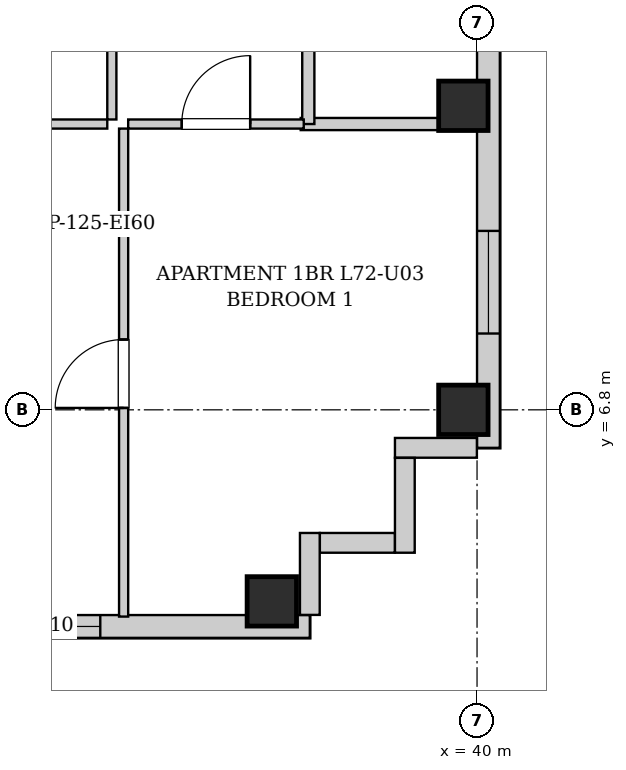
"""IFC4 building model, lengths in metres.
Left out: names, types, materials, properties, quantities, classifications, styles, units other than length and angle.
Written with IfcOpenShell. Run it as: python <this file> out.ifc"""

import sys

from ifc_helpers import new_model, si_unit, direction, frame, frame_2d, origin, origin_2d, place, context, subcontext, project, spatial, rectangle, extrude, element, fill, save


model = new_model("IFC4")
c1 = context("Model", 3, precision=1e-05, world=origin(), true_north=direction((0.0, 1.0)))
c2 = subcontext(c1, "Body", "Model", "MODEL_VIEW")
j1 = project(units=[si_unit("LENGTHUNIT", "METRE"), si_unit("PLANEANGLEUNIT", "RADIAN")], contexts=[c1])
p1 = place(None, origin())
s1 = spatial("IfcSite", under=j1, at=p1, CompositionType="ELEMENT")
p2 = place(p1, origin())
s2 = spatial("IfcBuilding", under=s1, at=p2, CompositionType="ELEMENT")
p3 = place(p2, frame((0.0, 0.0, 247.9)))
s3 = spatial("IfcBuildingStorey", under=s2, at=p3, CompositionType="ELEMENT", Elevation=247.9)
for number, where, z_axis, x_axis in (
    (1, (37.3, 4.28, 0.0), (0.0, 0.0, 1.0), (1.0, 0.0, 0.0)),
    (2, (39.82, 6.8, 0.0), (0.0, 0.0, 1.0), (1.0, 0.0, 0.0)),
    (3, (39.82, 10.8, 0.0), (0.0, 0.0, 1.0), (1.0, 0.0, 0.0)),
):
    element("IfcColumn", number, at=place(p3, frame(where, z_axis=z_axis, x_axis=x_axis)), inside=s3, PredefinedType="COLUMN", context=c2, shape_type="SweptSolid", body=[
        extrude(rectangle(XDim=0.65, YDim=0.65, at=origin_2d()), origin(), (0.0, 0.0, 1.0), 3.4),
    ])
p4 = place(p3, frame((40.15, 37.7, 0.0), z_axis=(0.0, 0.0, 1.0), x_axis=(0.0, -1.0, 0.0)))
e4 = element("IfcWall", 4, at=p4, inside=s3, PredefinedType="SOLIDWALL", context=c2, shape_type="SweptSolid", body=[
    extrude(rectangle(XDim=31.4, YDim=0.3, at=frame_2d((15.7, 0.0))), origin(), (0.0, 0.0, 1.0), 3.14),
])
p5 = place(p4, frame((28.546, 0.0, 0.55)))
e5 = element("IfcOpeningElement", 5, at=p5, cuts=e4, PredefinedType="OPENING", context=c2, shape_type="SweptSolid", body=[
    extrude(rectangle(XDim=1.35, YDim=1.2, at=frame_2d((0.675, 0.6))), frame((0.0, 0.16, 0.0), z_axis=(0.0, -1.0, 0.0), x_axis=(1.0, 0.0, 0.0)), (0.0, 0.0, 1.0), 0.32),
])
p6 = place(p4, frame((1.504, 0.0, 0.55)))
e6 = element("IfcOpeningElement", 6, at=p6, cuts=e4, PredefinedType="OPENING", context=c2, shape_type="SweptSolid", body=[
    extrude(rectangle(XDim=1.35, YDim=1.2, at=frame_2d((0.675, 0.6))), frame((0.0, 0.16, 0.0), z_axis=(0.0, -1.0, 0.0), x_axis=(1.0, 0.0, 0.0)), (0.0, 0.0, 1.0), 0.32),
])
p7 = place(p4, frame((19.683, 0.0, 0.55)))
e7 = element("IfcOpeningElement", 7, at=p7, cuts=e4, PredefinedType="OPENING", context=c2, shape_type="SweptSolid", body=[
    extrude(rectangle(XDim=1.35, YDim=1.2, at=frame_2d((0.675, 0.6))), frame((0.0, 0.16, 0.0), z_axis=(0.0, -1.0, 0.0), x_axis=(1.0, 0.0, 0.0)), (0.0, 0.0, 1.0), 0.32),
])
p8 = place(p4, frame((10.367, 0.0, 0.55)))
e8 = element("IfcOpeningElement", 8, at=p8, cuts=e4, PredefinedType="OPENING", context=c2, shape_type="SweptSolid", body=[
    extrude(rectangle(XDim=1.35, YDim=1.2, at=frame_2d((0.675, 0.6))), frame((0.0, 0.16, 0.0), z_axis=(0.0, -1.0, 0.0), x_axis=(1.0, 0.0, 0.0)), (0.0, 0.0, 1.0), 0.32),
])
p9 = place(p3, frame((37.8, 3.95, 0.0), z_axis=(0.0, 0.0, 1.0), x_axis=(-1.0, 0.0, 0.0)))
e9 = element("IfcWall", 9, at=p9, inside=s3, PredefinedType="SOLIDWALL", context=c2, shape_type="SweptSolid", body=[
    extrude(rectangle(XDim=16.85, YDim=0.3, at=frame_2d((8.425, 0.0))), origin(), (0.0, 0.0, 1.0), 3.14),
])
p10 = place(p9, frame((15.3, 0.0, 0.55)))
e10 = element("IfcOpeningElement", 10, at=p10, cuts=e9, PredefinedType="OPENING", context=c2, shape_type="SweptSolid", body=[
    extrude(rectangle(XDim=0.85, YDim=1.2, at=frame_2d((0.425, 0.6))), frame((0.0, 0.16, 0.0), z_axis=(0.0, -1.0, 0.0), x_axis=(1.0, 0.0, 0.0)), (0.0, 0.0, 1.0), 0.32),
])
p11 = place(p9, frame((8.95, 0.0, 0.55)))
e11 = element("IfcOpeningElement", 11, at=p11, cuts=e9, PredefinedType="OPENING", context=c2, shape_type="SweptSolid", body=[
    extrude(rectangle(XDim=1.35, YDim=1.2, at=frame_2d((0.675, 0.6))), frame((0.0, 0.16, 0.0), z_axis=(0.0, -1.0, 0.0), x_axis=(1.0, 0.0, 0.0)), (0.0, 0.0, 1.0), 0.32),
])
p12 = place(p9, frame((5.085, 0.0, 0.55)))
e12 = element("IfcOpeningElement", 12, at=p12, cuts=e9, PredefinedType="OPENING", context=c2, shape_type="SweptSolid", body=[
    extrude(rectangle(XDim=1.35, YDim=1.2, at=frame_2d((0.675, 0.6))), frame((0.0, 0.16, 0.0), z_axis=(0.0, -1.0, 0.0), x_axis=(1.0, 0.0, 0.0)), (0.0, 0.0, 1.0), 0.32),
])
p13 = place(p9, frame((2.757, 0.0, 0.55)))
e13 = element("IfcOpeningElement", 13, at=p13, cuts=e9, PredefinedType="OPENING", context=c2, shape_type="SweptSolid", body=[
    extrude(rectangle(XDim=1.35, YDim=1.2, at=frame_2d((0.675, 0.6))), frame((0.0, 0.16, 0.0), z_axis=(0.0, -1.0, 0.0), x_axis=(1.0, 0.0, 0.0)), (0.0, 0.0, 1.0), 0.32),
])
p14 = place(p3, frame((39.998, 6.3, 0.0), z_axis=(0.0, 0.0, 1.0), x_axis=(-1.0, 0.0, 0.0)))
e14 = element("IfcWall", 14, at=p14, inside=s3, PredefinedType="SOLIDWALL", context=c2, shape_type="SweptSolid", body=[
    extrude(rectangle(XDim=1.078, YDim=0.26, at=frame_2d((0.539, 0.0))), origin(), (0.0, 0.0, 1.0), 3.14),
])
p15 = place(p3, frame((39.05, 6.168, 0.0), z_axis=(0.0, 0.0, 1.0), x_axis=(0.0, -1.0, 0.0)))
e15 = element("IfcWall", 15, at=p15, inside=s3, PredefinedType="SOLIDWALL", context=c2, shape_type="SweptSolid", body=[
    extrude(rectangle(XDim=1.248, YDim=0.26, at=frame_2d((0.624, 0.0))), origin(), (0.0, 0.0, 1.0), 3.14),
])
p16 = place(p3, frame((38.918, 5.05, 0.0), z_axis=(0.0, 0.0, 1.0), x_axis=(-1.0, 0.0, 0.0)))
e16 = element("IfcWall", 16, at=p16, inside=s3, PredefinedType="SOLIDWALL", context=c2, shape_type="SweptSolid", body=[
    extrude(rectangle(XDim=0.986, YDim=0.26, at=frame_2d((0.493, 0.0))), origin(), (0.0, 0.0, 1.0), 3.14),
])
p17 = place(p3, frame((37.8, 5.18, 0.0), z_axis=(0.0, 0.0, 1.0), x_axis=(0.0, -1.0, 0.0)))
e17 = element("IfcWall", 17, at=p17, inside=s3, PredefinedType="SOLIDWALL", context=c2, shape_type="SweptSolid", body=[
    extrude(rectangle(XDim=1.078, YDim=0.26, at=frame_2d((0.539, 0.0))), origin(), (0.0, 0.0, 1.0), 3.14),
])
p18 = place(p3, frame((37.68, 10.56, 0.0), z_axis=(0.0, 0.0, 1.0), x_axis=(1.0, 0.0, 0.0)))
e18 = element("IfcWall", 18, at=p18, inside=s3, PredefinedType="PARTITIONING", context=c2, shape_type="SweptSolid", body=[
    extrude(rectangle(XDim=2.34, YDim=0.16, at=frame_2d((1.17, 0.0))), origin(), (0.0, 0.0, 1.0), 3.14),
])
p19 = place(p3, frame((37.78, 10.56, 0.0), z_axis=(0.0, 0.0, 1.0), x_axis=(0.0, 1.0, 0.0)))
e19 = element("IfcWall", 19, at=p19, inside=s3, PredefinedType="PARTITIONING", context=c2, shape_type="SweptSolid", body=[
    extrude(rectangle(XDim=2.91, YDim=0.16, at=frame_2d((1.455, 0.0))), origin(), (0.0, 0.0, 1.0), 3.14),
])
p20 = place(p3, frame((35.195, 10.62, 0.0), z_axis=(0.0, 0.0, 1.0), x_axis=(0.0, 1.0, 0.0)))
e20 = element("IfcWall", 20, at=p20, inside=s3, PredefinedType="PARTITIONING", context=c2, shape_type="SweptSolid", body=[
    extrude(rectangle(XDim=2.85, YDim=0.12, at=frame_2d((1.425, 0.0))), origin(), (0.0, 0.0, 1.0), 3.14),
])
p21 = place(p20, frame((0.975, 0.0, 0.0)))
e21 = element("IfcOpeningElement", 21, at=p21, cuts=e20, PredefinedType="OPENING", context=c2, shape_type="SweptSolid", body=[
    extrude(rectangle(XDim=0.9, YDim=2.05, at=frame_2d((0.45, 1.025))), frame((0.0, 0.07, 0.0), z_axis=(0.0, -1.0, 0.0), x_axis=(1.0, 0.0, 0.0)), (0.0, 0.0, 1.0), 0.14),
])
p22 = place(p3, frame((31.685, 10.56, 0.0), z_axis=(0.0, 0.0, 1.0), x_axis=(1.0, 0.0, 0.0)))
e22 = element("IfcWall", 22, at=p22, inside=s3, PredefinedType="PARTITIONING", context=c2, shape_type="SweptSolid", body=[
    extrude(rectangle(XDim=3.45, YDim=0.12, at=frame_2d((1.725, 0.0))), origin(), (0.0, 0.0, 1.0), 3.14),
])
p23 = place(p22, frame((1.275, 0.0, 0.0)))
e23 = element("IfcOpeningElement", 23, at=p23, cuts=e22, PredefinedType="OPENING", context=c2, shape_type="SweptSolid", body=[
    extrude(rectangle(XDim=0.9, YDim=2.05, at=frame_2d((0.45, 1.025))), frame((0.0, 0.07, 0.0), z_axis=(0.0, -1.0, 0.0), x_axis=(1.0, 0.0, 0.0)), (0.0, 0.0, 1.0), 0.14),
])
p24 = place(p3, frame((35.41, 10.56, 0.0), z_axis=(0.0, 0.0, 1.0), x_axis=(1.0, 0.0, 0.0)))
e24 = element("IfcWall", 24, at=p24, inside=s3, PredefinedType="PARTITIONING", context=c2, shape_type="SweptSolid", body=[
    extrude(rectangle(XDim=2.31, YDim=0.12, at=frame_2d((1.155, 0.0))), origin(), (0.0, 0.0, 1.0), 3.14),
])
p25 = place(p24, frame((0.705, 0.0, 0.0)))
e25 = element("IfcOpeningElement", 25, at=p25, cuts=e24, PredefinedType="OPENING", context=c2, shape_type="SweptSolid", body=[
    extrude(rectangle(XDim=0.9, YDim=2.05, at=frame_2d((0.45, 1.025))), frame((0.0, 0.07, 0.0), z_axis=(0.0, -1.0, 0.0), x_axis=(1.0, 0.0, 0.0)), (0.0, 0.0, 1.0), 0.14),
])
p26 = place(p3, frame((35.35, 4.08, 0.0), z_axis=(0.0, 0.0, 1.0), x_axis=(0.0, 1.0, 0.0)))
e26 = element("IfcWall", 26, at=p26, inside=s3, PredefinedType="PARTITIONING", context=c2, shape_type="SweptSolid", body=[
    extrude(rectangle(XDim=6.42, YDim=0.12, at=frame_2d((3.21, 0.0))), origin(), (0.0, 0.0, 1.0), 3.14),
])
p27 = place(p26, frame((2.745, 0.0, 0.0)))
e27 = element("IfcOpeningElement", 27, at=p27, cuts=e26, PredefinedType="OPENING", context=c2, shape_type="SweptSolid", body=[
    extrude(rectangle(XDim=0.9, YDim=2.05, at=frame_2d((0.45, 1.025))), frame((0.0, 0.07, 0.0), z_axis=(0.0, -1.0, 0.0), x_axis=(1.0, 0.0, 0.0)), (0.0, 0.0, 1.0), 0.14),
])
p28 = place(p25, origin())
e28 = element("IfcDoor", 28, at=p28, inside=s3, OperationType="SINGLE_SWING_RIGHT", PredefinedType="DOOR", context=c2, shape_type="SweptSolid", body=[
    extrude(rectangle(XDim=0.9, YDim=2.05, at=frame_2d((0.45, 1.025))), frame((0.0, 0.025, 0.0), z_axis=(0.0, -1.0, 0.0), x_axis=(1.0, 0.0, 0.0)), (0.0, 0.0, 1.0), 0.05),
])
fill(e25, e28)
p29 = place(p27, origin())
e29 = element("IfcDoor", 29, at=p29, inside=s3, OperationType="SINGLE_SWING_LEFT", PredefinedType="DOOR", context=c2, shape_type="SweptSolid", body=[
    extrude(rectangle(XDim=0.9, YDim=2.05, at=frame_2d((0.45, 1.025))), frame((0.0, 0.025, 0.0), z_axis=(0.0, -1.0, 0.0), x_axis=(1.0, 0.0, 0.0)), (0.0, 0.0, 1.0), 0.05),
])
fill(e27, e29)
p30 = place(p13, origin())
e30 = element("IfcWindow", 30, at=p30, inside=s3, PartitioningType="SINGLE_PANEL", PredefinedType="WINDOW", context=c2, shape_type="SweptSolid", body=[
    extrude(rectangle(XDim=1.35, YDim=1.2, at=frame_2d((0.675, 0.6))), frame((0.0, 0.03, 0.0), z_axis=(0.0, -1.0, 0.0), x_axis=(1.0, 0.0, 0.0)), (0.0, 0.0, 1.0), 0.06),
])
fill(e13, e30)
p31 = place(p5, origin())
e31 = element("IfcWindow", 31, at=p31, inside=s3, PartitioningType="SINGLE_PANEL", PredefinedType="WINDOW", context=c2, shape_type="SweptSolid", body=[
    extrude(rectangle(XDim=1.35, YDim=1.2, at=frame_2d((0.675, 0.6))), frame((0.0, 0.03, 0.0), z_axis=(0.0, -1.0, 0.0), x_axis=(1.0, 0.0, 0.0)), (0.0, 0.0, 1.0), 0.06),
])
fill(e5, e31)
save(model, sys.argv[1])
